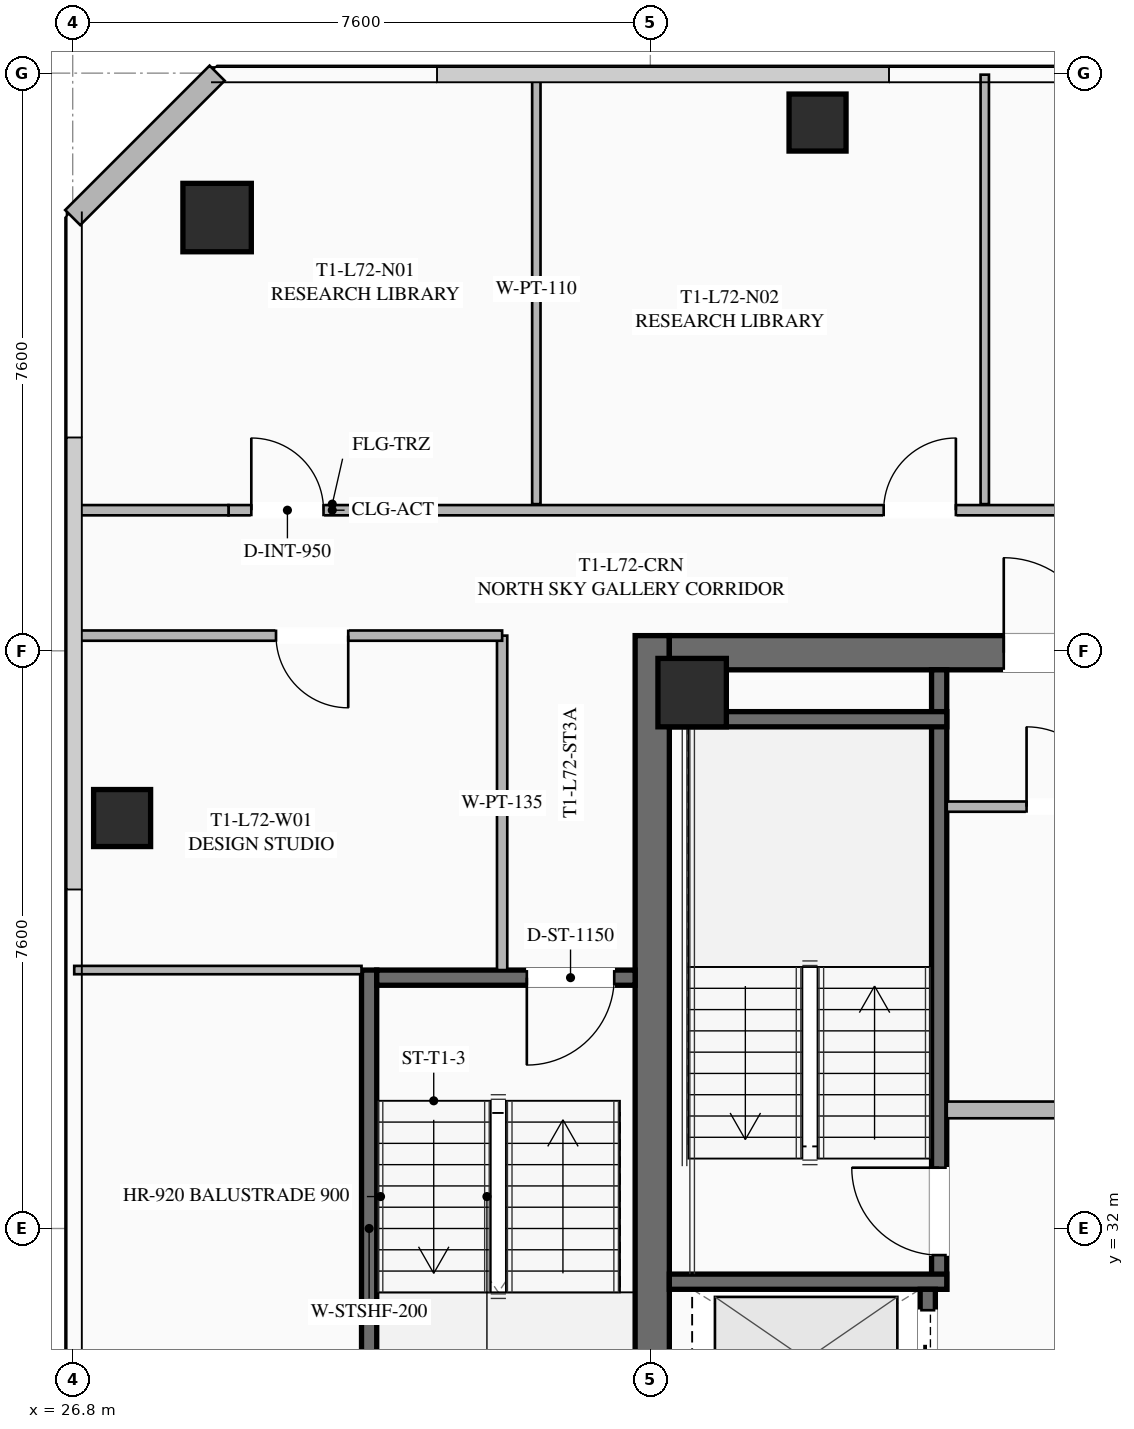
"""IFC4 building model, lengths in metres.
Left out: names, types, materials, properties, quantities, classifications, styles, units other than length and angle.
Written with IfcOpenShell. Run it as: python <this file> out.ifc"""

import sys

from ifc_helpers import new_model, si_unit, direction, frame, frame_2d, origin, origin_2d, place, context, subcontext, project, spatial, rectangle, hollow_rectangle, extrude, element, fill, save


model = new_model("IFC4")
c1 = context("Model", 3, precision=1e-05, world=origin(), true_north=direction((0.0, 1.0)))
c2 = subcontext(c1, "Body", "Model", "MODEL_VIEW")
j1 = project(units=[si_unit("LENGTHUNIT", "METRE"), si_unit("PLANEANGLEUNIT", "RADIAN")], contexts=[c1])
p1 = place(None, origin())
s1 = spatial("IfcSite", under=j1, at=p1, CompositionType="ELEMENT")
p2 = place(p1, origin())
s2 = spatial("IfcBuilding", under=s1, at=p2, CompositionType="ELEMENT")
p3 = place(p2, frame((0.0, 0.0, 266.95)))
s3 = spatial("IfcBuildingStorey", under=s2, at=p3, CompositionType="ELEMENT", Elevation=266.95)
p4 = place(p3, frame((34.425, 24.2, 0.0), z_axis=(0.0, 0.0, 1.0), x_axis=(0.0, 1.0, 0.0)))
e1 = element("IfcWall", 1, at=p4, inside=s3, PredefinedType="SHEAR", context=c2, shape_type="SweptSolid", body=[
    extrude(rectangle(XDim=15.6, YDim=0.45, at=frame_2d((7.8, 0.0))), origin(), (0.0, 0.0, 1.0), 3.55),
])
p5 = place(p3, frame((34.65, 39.575, 0.0), z_axis=(0.0, 0.0, 1.0), x_axis=(1.0, 0.0, 0.0)))
e2 = element("IfcWall", 2, at=p5, inside=s3, PredefinedType="SHEAR", context=c2, shape_type="SweptSolid", body=[
    extrude(rectangle(XDim=14.7, YDim=0.45, at=frame_2d((7.35, 0.0))), origin(), (0.0, 0.0, 1.0), 3.55),
])
p6 = place(p5, frame((4.4, 0.0, 0.0)))
e3 = element("IfcOpeningElement", 3, at=p6, cuts=e2, PredefinedType="OPENING", context=c2, shape_type="SweptSolid", body=[
    extrude(rectangle(XDim=1.25, YDim=2.25, at=frame_2d((0.625, 1.125))), frame((0.0, 0.235, 0.0), z_axis=(0.0, -1.0, 0.0), x_axis=(1.0, 0.0, 0.0)), (0.0, 0.0, 1.0), 0.47),
])
p7 = place(p5, frame((9.45, 0.0, 0.0)))
e4 = element("IfcOpeningElement", 4, at=p7, cuts=e2, PredefinedType="OPENING", context=c2, shape_type="SweptSolid", body=[
    extrude(rectangle(XDim=1.25, YDim=2.25, at=frame_2d((0.625, 1.125))), frame((0.0, 0.235, 0.0), z_axis=(0.0, -1.0, 0.0), x_axis=(1.0, 0.0, 0.0)), (0.0, 0.0, 1.0), 0.47),
])
for number, where, z_axis, x_axis in (
    (5, (34.95, 39.05, 0.0), (0.0, 0.0, 1.0), (1.0, 0.0, 0.0)),
    (6, (28.7, 45.3, 0.0), (0.0, 0.0, 1.0), (1.0, 0.0, 0.0)),
):
    element("IfcColumn", number, at=place(p3, frame(where, z_axis=z_axis, x_axis=x_axis)), inside=s3, PredefinedType="COLUMN", context=c2, shape_type="SweptSolid", body=[
        extrude(hollow_rectangle(XDim=0.9, YDim=0.9, WallThickness=0.04, at=origin_2d()), origin(), (0.0, 0.0, 1.0), 3.37),
    ])
for number, where, z_axis, x_axis in (
    (7, (36.6, 46.55, 0.0), (0.0, 0.0, 1.0), (1.0, 0.0, 0.0)),
    (8, (27.45, 37.4, 0.0), (0.0, 0.0, 1.0), (1.0, 0.0, 0.0)),
):
    element("IfcColumn", number, at=place(p3, frame(where, z_axis=z_axis, x_axis=x_axis)), inside=s3, PredefinedType="COLUMN", context=c2, shape_type="SweptSolid", body=[
        extrude(hollow_rectangle(XDim=0.75, YDim=0.75, WallThickness=0.032, at=origin_2d()), origin(), (0.0, 0.0, 1.0), 3.37),
    ])
p8 = place(p3, frame((26.8, 45.3, 0.0), z_axis=(0.0, 0.0, 1.0), x_axis=(0.707106781187, 0.707106781187, 0.0)))
e9 = element("IfcWall", 9, at=p8, inside=s3, PredefinedType="SOLIDWALL", context=c2, shape_type="SweptSolid", body=[
    extrude(rectangle(XDim=2.687, YDim=0.28, at=frame_2d((1.343, 0.0))), origin(), (0.0, 0.0, 1.0), 3.37),
])
p9 = place(p3, frame((38.2, 31.2, 0.0), z_axis=(0.0, 0.0, 1.0), x_axis=(0.0, 1.0, 0.0)))
e10 = element("IfcWall", 10, at=p9, inside=s3, PredefinedType="SHEAR", context=c2, shape_type="SweptSolid", body=[
    extrude(rectangle(XDim=8.15, YDim=0.2, at=frame_2d((4.075, 0.0))), origin(), (0.0, 0.0, 1.0), 3.37),
])
p10 = place(p9, frame((0.45, 0.0, 0.0)))
e11 = element("IfcOpeningElement", 11, at=p10, cuts=e10, PredefinedType="OPENING", context=c2, shape_type="SweptSolid", body=[
    extrude(rectangle(XDim=1.15, YDim=2.2, at=frame_2d((0.575, 1.1))), frame((0.0, 0.11, 0.0), z_axis=(0.0, -1.0, 0.0), x_axis=(1.0, 0.0, 0.0)), (0.0, 0.0, 1.0), 0.22),
])
for number, where, z_axis, x_axis in (
    (12, (34.65, 31.3, 0.0), (0.0, 0.0, 1.0), (1.0, 0.0, 0.0)),
    (13, (34.65, 38.7, 0.0), (0.0, 0.0, 1.0), (1.0, 0.0, 0.0)),
):
    element("IfcWall", number, at=place(p3, frame(where, z_axis=z_axis, x_axis=x_axis)), inside=s3, PredefinedType="SHEAR", context=c2, shape_type="SweptSolid", body=[
        extrude(rectangle(XDim=3.65, YDim=0.2, at=frame_2d((1.825, 0.0))), origin(), (0.0, 0.0, 1.0), 3.37),
    ])
p11 = place(p3, frame((38.3, 33.56, 0.0), z_axis=(0.0, 0.0, 1.0), x_axis=(1.0, 0.0, 0.0)))
e14 = element("IfcWall", 14, at=p11, inside=s3, PredefinedType="SOLIDWALL", context=c2, shape_type="SweptSolid", body=[
    extrude(rectangle(XDim=3.15, YDim=0.22, at=frame_2d((1.575, 0.0))), origin(), (0.0, 0.0, 1.0), 2.723),
])
p12 = place(p3, frame((38.05, 24.65, 0.0), z_axis=(0.0, 0.0, 1.0), x_axis=(0.0, 1.0, 0.0)))
e15 = element("IfcWall", 15, at=p12, inside=s3, PredefinedType="SHEAR", context=c2, shape_type="SweptSolid", body=[
    extrude(rectangle(XDim=6.55, YDim=0.2, at=frame_2d((3.275, 0.0))), origin(), (0.0, 0.0, 1.0), 3.37),
])
p13 = place(p12, frame((4.975, 0.0, 0.0)))
e16 = element("IfcOpeningElement", 16, at=p13, cuts=e15, PredefinedType="OPENING", context=c2, shape_type="SweptSolid", body=[
    extrude(rectangle(XDim=1.3, YDim=2.25, at=frame_2d((0.65, 1.125))), frame((0.0, 0.11, 0.0), z_axis=(0.0, -1.0, 0.0), x_axis=(1.0, 0.0, 0.0)), (0.0, 0.0, 1.0), 0.22),
])
p14 = place(p12, frame((2.975, 0.0, 0.0)))
e17 = element("IfcOpeningElement", 17, at=p14, cuts=e15, PredefinedType="OPENING", context=c2, shape_type="SweptSolid", body=[
    extrude(rectangle(XDim=1.3, YDim=2.25, at=frame_2d((0.65, 1.125))), frame((0.0, 0.11, 0.0), z_axis=(0.0, -1.0, 0.0), x_axis=(1.0, 0.0, 0.0)), (0.0, 0.0, 1.0), 0.22),
])
p15 = place(p12, frame((0.775, 0.0, 0.0)))
e18 = element("IfcOpeningElement", 18, at=p15, cuts=e15, PredefinedType="OPENING", context=c2, shape_type="SweptSolid", body=[
    extrude(rectangle(XDim=1.3, YDim=2.25, at=frame_2d((0.65, 1.125))), frame((0.0, 0.11, 0.0), z_axis=(0.0, -1.0, 0.0), x_axis=(1.0, 0.0, 0.0)), (0.0, 0.0, 1.0), 0.22),
])
p16 = place(p3, frame((38.3, 37.55, 0.0), z_axis=(0.0, 0.0, 1.0), x_axis=(1.0, 0.0, 0.0)))
e19 = element("IfcWall", 19, at=p16, inside=s3, PredefinedType="PARTITIONING", context=c2, shape_type="SweptSolid", body=[
    extrude(rectangle(XDim=3.15, YDim=0.135, at=frame_2d((1.575, 0.0))), origin(), (0.0, 0.0, 1.0), 2.723),
])
p17 = place(p16, frame((1.05, 0.0, 0.0)))
e20 = element("IfcOpeningElement", 20, at=p17, cuts=e19, PredefinedType="OPENING", context=c2, shape_type="SweptSolid", body=[
    extrude(rectangle(XDim=1.05, YDim=2.2, at=frame_2d((0.525, 1.1))), frame((0.0, 0.077, 0.0), z_axis=(0.0, -1.0, 0.0), x_axis=(1.0, 0.0, 0.0)), (0.0, 0.0, 1.0), 0.155),
])
p18 = place(p3, frame((30.7, 28.6, 0.0), z_axis=(0.0, 0.0, 1.0), x_axis=(0.0, 1.0, 0.0)))
e21 = element("IfcWall", 21, at=p18, inside=s3, PredefinedType="SHEAR", context=c2, shape_type="SweptSolid", body=[
    extrude(rectangle(XDim=6.8, YDim=0.2, at=frame_2d((3.4, 0.0))), origin(), (0.0, 0.0, 1.0), 3.37),
])
p19 = place(p3, frame((34.2, 35.3, 0.0), z_axis=(0.0, 0.0, 1.0), x_axis=(-1.0, 0.0, 0.0)))
e22 = element("IfcWall", 22, at=p19, inside=s3, PredefinedType="SHEAR", context=c2, shape_type="SweptSolid", body=[
    extrude(rectangle(XDim=3.4, YDim=0.2, at=frame_2d((1.7, 0.0))), origin(), (0.0, 0.0, 1.0), 3.37),
])
p20 = place(p19, frame((0.275, 0.0, 0.0)))
e23 = element("IfcOpeningElement", 23, at=p20, cuts=e22, PredefinedType="OPENING", context=c2, shape_type="SweptSolid", body=[
    extrude(rectangle(XDim=1.15, YDim=2.2, at=frame_2d((0.575, 1.1))), frame((0.0, 0.11, 0.0), z_axis=(0.0, -1.0, 0.0), x_axis=(1.0, 0.0, 0.0)), (0.0, 0.0, 1.0), 0.22),
])
p21 = place(p3, frame((32.45, 35.4, 0.0), z_axis=(0.0, 0.0, 1.0), x_axis=(0.0, 1.0, 0.0)))
e24 = element("IfcWall", 24, at=p21, inside=s3, PredefinedType="PARTITIONING", context=c2, shape_type="SweptSolid", body=[
    extrude(rectangle(XDim=4.4, YDim=0.135, at=frame_2d((2.2, 0.0))), origin(), (0.0, 0.0, 1.0), 2.723),
])
p22 = place(p3, frame((28.85, 41.45, 0.0), z_axis=(0.0, 0.0, 1.0), x_axis=(1.0, 0.0, 0.0)))
e25 = element("IfcWall", 25, at=p22, inside=s3, PredefinedType="PARTITIONING", context=c2, shape_type="SweptSolid", body=[
    extrude(rectangle(XDim=26.3, YDim=0.135, at=frame_2d((13.15, 0.0))), origin(), (0.0, 0.0, 1.0), 2.723),
])
p23 = place(p22, frame((0.3, 0.0, 0.0)))
e26 = element("IfcOpeningElement", 26, at=p23, cuts=e25, PredefinedType="OPENING", context=c2, shape_type="SweptSolid", body=[
    extrude(rectangle(XDim=0.95, YDim=2.05, at=frame_2d((0.475, 1.025))), frame((0.0, 0.077, 0.0), z_axis=(0.0, -1.0, 0.0), x_axis=(1.0, 0.0, 0.0)), (0.0, 0.0, 1.0), 0.155),
])
p24 = place(p22, frame((8.62, 0.0, 0.0)))
e27 = element("IfcOpeningElement", 27, at=p24, cuts=e25, PredefinedType="OPENING", context=c2, shape_type="SweptSolid", body=[
    extrude(rectangle(XDim=0.95, YDim=2.05, at=frame_2d((0.475, 1.025))), frame((0.0, 0.077, 0.0), z_axis=(0.0, -1.0, 0.0), x_axis=(1.0, 0.0, 0.0)), (0.0, 0.0, 1.0), 0.155),
])
p25 = place(p22, frame((12.923, 0.0, 0.0)))
e28 = element("IfcOpeningElement", 28, at=p25, cuts=e25, PredefinedType="OPENING", context=c2, shape_type="SweptSolid", body=[
    extrude(rectangle(XDim=0.95, YDim=2.05, at=frame_2d((0.475, 1.025))), frame((0.0, 0.077, 0.0), z_axis=(0.0, -1.0, 0.0), x_axis=(1.0, 0.0, 0.0)), (0.0, 0.0, 1.0), 0.155),
])
p26 = place(p22, frame((16.728, 0.0, 0.0)))
e29 = element("IfcOpeningElement", 29, at=p26, cuts=e25, PredefinedType="OPENING", context=c2, shape_type="SweptSolid", body=[
    extrude(rectangle(XDim=0.95, YDim=2.05, at=frame_2d((0.475, 1.025))), frame((0.0, 0.077, 0.0), z_axis=(0.0, -1.0, 0.0), x_axis=(1.0, 0.0, 0.0)), (0.0, 0.0, 1.0), 0.155),
])
p27 = place(p22, frame((25.05, 0.0, 0.0)))
e30 = element("IfcOpeningElement", 30, at=p27, cuts=e25, PredefinedType="OPENING", context=c2, shape_type="SweptSolid", body=[
    extrude(rectangle(XDim=0.95, YDim=2.05, at=frame_2d((0.475, 1.025))), frame((0.0, 0.077, 0.0), z_axis=(0.0, -1.0, 0.0), x_axis=(1.0, 0.0, 0.0)), (0.0, 0.0, 1.0), 0.155),
])
p28 = place(p3, frame((26.82, 41.45, 0.0), z_axis=(0.0, 0.0, 1.0), x_axis=(1.0, 0.0, 0.0)))
e31 = element("IfcWall", 31, at=p28, inside=s3, PredefinedType="PARTITIONING", context=c2, shape_type="SweptSolid", body=[
    extrude(rectangle(XDim=2.03, YDim=0.135, at=frame_2d((1.015, 0.0))), origin(), (0.0, 0.0, 1.0), 2.723),
])
for number, where, z_axis, x_axis in (
    (32, (32.9, 41.53, 0.0), (0.0, 0.0, 1.0), (0.0, 1.0, 0.0)),
    (33, (38.8, 41.53, 0.0), (0.0, 0.0, 1.0), (0.0, 1.0, 0.0)),
):
    element("IfcWall", number, at=place(p3, frame(where, z_axis=z_axis, x_axis=x_axis)), inside=s3, PredefinedType="PARTITIONING", context=c2, shape_type="SweptSolid", body=[
        extrude(rectangle(XDim=5.65, YDim=0.11, at=frame_2d((2.825, 0.0))), origin(), (0.0, 0.0, 1.0), 2.723),
    ])
p29 = place(p3, frame((32.45, 39.8, 0.0), z_axis=(0.0, 0.0, 1.0), x_axis=(-1.0, 0.0, 0.0)))
e34 = element("IfcWall", 34, at=p29, inside=s3, PredefinedType="PARTITIONING", context=c2, shape_type="SweptSolid", body=[
    extrude(rectangle(XDim=5.63, YDim=0.135, at=frame_2d((2.815, 0.0))), origin(), (0.0, 0.0, 1.0), 2.723),
])
p30 = place(p29, frame((2.025, 0.0, 0.0)))
e35 = element("IfcOpeningElement", 35, at=p30, cuts=e34, PredefinedType="OPENING", context=c2, shape_type="SweptSolid", body=[
    extrude(rectangle(XDim=0.95, YDim=2.05, at=frame_2d((0.475, 1.025))), frame((0.0, 0.077, 0.0), z_axis=(0.0, -1.0, 0.0), x_axis=(1.0, 0.0, 0.0)), (0.0, 0.0, 1.0), 0.155),
])
p31 = place(p3, frame((30.6, 35.4, 0.0), z_axis=(0.0, 0.0, 1.0), x_axis=(-1.0, 0.0, 0.0)))
e36 = element("IfcWall", 36, at=p31, inside=s3, PredefinedType="PARTITIONING", context=c2, shape_type="SweptSolid", body=[
    extrude(rectangle(XDim=3.78, YDim=0.11, at=frame_2d((1.89, 0.0))), origin(), (0.0, 0.0, 1.0), 2.723),
])
p32 = place(p6, origin())
e37 = element("IfcDoor", 37, at=p32, inside=s3, OperationType="SINGLE_SWING_LEFT", PredefinedType="DOOR", context=c2, shape_type="SweptSolid", body=[
    extrude(rectangle(XDim=1.25, YDim=2.25, at=frame_2d((0.625, 1.125))), frame((0.0, 0.025, 0.0), z_axis=(0.0, -1.0, 0.0), x_axis=(1.0, 0.0, 0.0)), (0.0, 0.0, 1.0), 0.05),
])
fill(e3, e37)
p33 = place(p10, origin())
e38 = element("IfcDoor", 38, at=p33, inside=s3, OperationType="SINGLE_SWING_RIGHT", PredefinedType="DOOR", context=c2, shape_type="SweptSolid", body=[
    extrude(rectangle(XDim=1.15, YDim=2.2, at=frame_2d((0.575, 1.1))), frame((0.0, 0.025, 0.0), z_axis=(0.0, -1.0, 0.0), x_axis=(1.0, 0.0, 0.0)), (0.0, 0.0, 1.0), 0.05),
])
fill(e11, e38)
p34 = place(p17, origin())
e39 = element("IfcDoor", 39, at=p34, inside=s3, OperationType="SINGLE_SWING_LEFT", PredefinedType="DOOR", context=c2, shape_type="SweptSolid", body=[
    extrude(rectangle(XDim=1.05, YDim=2.2, at=frame_2d((0.525, 1.1))), frame((0.0, 0.025, 0.0), z_axis=(0.0, -1.0, 0.0), x_axis=(1.0, 0.0, 0.0)), (0.0, 0.0, 1.0), 0.05),
])
fill(e20, e39)
p35 = place(p20, origin())
e40 = element("IfcDoor", 40, at=p35, inside=s3, OperationType="SINGLE_SWING_RIGHT", PredefinedType="DOOR", context=c2, shape_type="SweptSolid", body=[
    extrude(rectangle(XDim=1.15, YDim=2.2, at=frame_2d((0.575, 1.1))), frame((0.0, 0.025, 0.0), z_axis=(0.0, -1.0, 0.0), x_axis=(1.0, 0.0, 0.0)), (0.0, 0.0, 1.0), 0.05),
])
fill(e23, e40)
p36 = place(p23, origin())
e41 = element("IfcDoor", 41, at=p36, inside=s3, OperationType="SINGLE_SWING_LEFT", PredefinedType="DOOR", context=c2, shape_type="SweptSolid", body=[
    extrude(rectangle(XDim=0.95, YDim=2.05, at=frame_2d((0.475, 1.025))), frame((0.0, 0.025, 0.0), z_axis=(0.0, -1.0, 0.0), x_axis=(1.0, 0.0, 0.0)), (0.0, 0.0, 1.0), 0.05),
])
fill(e26, e41)
p37 = place(p24, origin())
e42 = element("IfcDoor", 42, at=p37, inside=s3, OperationType="SINGLE_SWING_RIGHT", PredefinedType="DOOR", context=c2, shape_type="SweptSolid", body=[
    extrude(rectangle(XDim=0.95, YDim=2.05, at=frame_2d((0.475, 1.025))), frame((0.0, 0.025, 0.0), z_axis=(0.0, -1.0, 0.0), x_axis=(1.0, 0.0, 0.0)), (0.0, 0.0, 1.0), 0.05),
])
fill(e27, e42)
p38 = place(p30, origin())
e43 = element("IfcDoor", 43, at=p38, inside=s3, OperationType="SINGLE_SWING_LEFT", PredefinedType="DOOR", context=c2, shape_type="SweptSolid", body=[
    extrude(rectangle(XDim=0.95, YDim=2.05, at=frame_2d((0.475, 1.025))), frame((0.0, 0.025, 0.0), z_axis=(0.0, -1.0, 0.0), x_axis=(1.0, 0.0, 0.0)), (0.0, 0.0, 1.0), 0.05),
])
fill(e35, e43)
p39 = place(p13, origin())
e44 = element("IfcDoor", 44, at=p39, inside=s3, OperationType="SLIDING_TO_LEFT", PredefinedType="DOOR", context=c2, shape_type="SweptSolid", body=[
    extrude(rectangle(XDim=1.3, YDim=2.25, at=frame_2d((0.65, 1.125))), frame((0.0, 0.025, 0.0), z_axis=(0.0, -1.0, 0.0), x_axis=(1.0, 0.0, 0.0)), (0.0, 0.0, 1.0), 0.05),
])
fill(e16, e44)
save(model, sys.argv[1])
